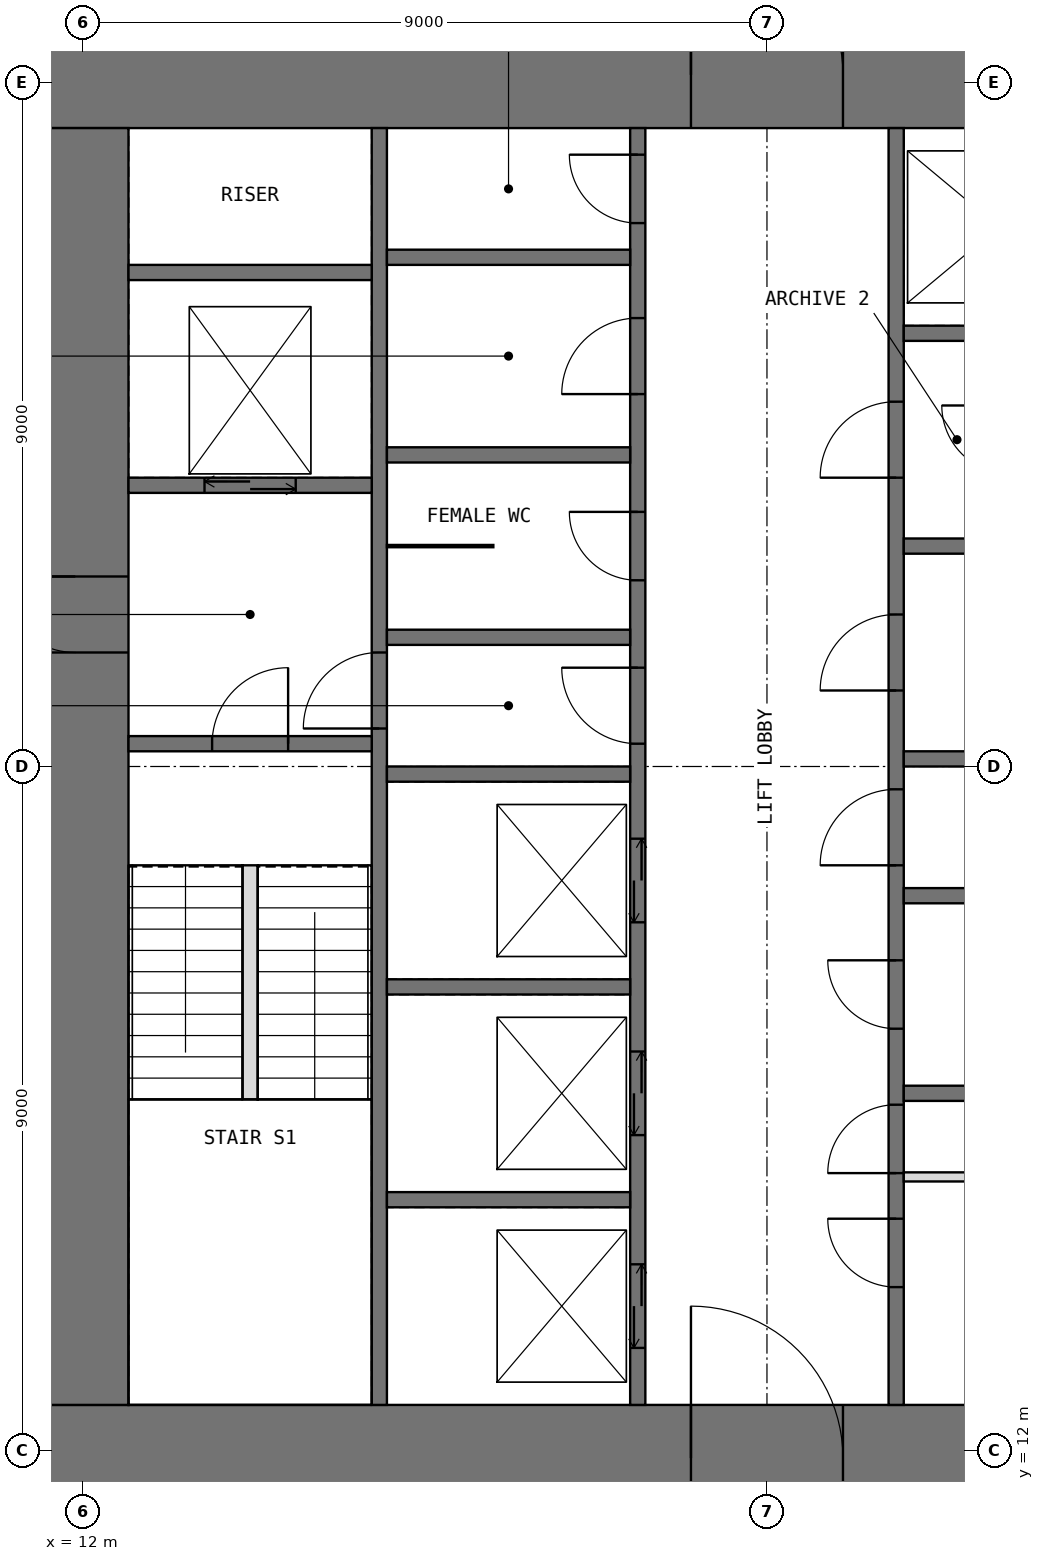
"""IFC4 building model, lengths in metres.
Left out: names, types, materials, properties, quantities, classifications, styles, units other than length and angle.
Written with IfcOpenShell. Run it as: python <this file> out.ifc"""

import sys

from ifc_helpers import new_model, si_unit, direction, frame, frame_2d, origin, place, context, subcontext, project, spatial, rectangle, extrude, element, fill, save


model = new_model("IFC4")
c1 = context("Model", 3, precision=1e-05, world=origin(), true_north=direction((0.0, 1.0)))
c2 = subcontext(c1, "Body", "Model", "MODEL_VIEW")
j1 = project(units=[si_unit("LENGTHUNIT", "METRE"), si_unit("PLANEANGLEUNIT", "RADIAN")], contexts=[c1])
p1 = place(None, origin())
s1 = spatial("IfcSite", under=j1, at=p1, CompositionType="ELEMENT")
p2 = place(p1, origin())
s2 = spatial("IfcBuilding", under=s1, at=p2, CompositionType="ELEMENT")
p3 = place(p2, frame((0.0, 0.0, 182.5)))
s3 = spatial("IfcBuildingStorey", under=s2, at=p3, CompositionType="ELEMENT", Elevation=182.5)
p4 = place(p3, frame((11.2, 11.9, -0.05), z_axis=(0.0, 0.0, 1.0), x_axis=(1.0, 0.0, 0.0)))
e1 = element("IfcWall", 1, at=p4, inside=s3, PredefinedType="SHEAR", context=c2, shape_type="SweptSolid", body=[
    extrude(rectangle(XDim=19.6, YDim=1.4, at=frame_2d((9.8, 0.0))), origin(), (0.0, 0.0, 1.0), 4.0),
])
p5 = place(p4, frame((8.8, 0.0, 0.05)))
e2 = element("IfcOpeningElement", 2, at=p5, cuts=e1, PredefinedType="OPENING", context=c2, shape_type="SweptSolid", body=[
    extrude(rectangle(XDim=2.0, YDim=2.2, at=frame_2d((1.0, 1.1))), frame((0.0, 0.71, 0.0), z_axis=(0.0, -1.0, 0.0), x_axis=(1.0, 0.0, 0.0)), (0.0, 0.0, 1.0), 1.42),
])
p6 = place(p3, frame((11.2, 30.1, -0.05), z_axis=(0.0, 0.0, 1.0), x_axis=(1.0, 0.0, 0.0)))
e3 = element("IfcWall", 3, at=p6, inside=s3, PredefinedType="SHEAR", context=c2, shape_type="SweptSolid", body=[
    extrude(rectangle(XDim=19.6, YDim=1.4, at=frame_2d((9.8, 0.0))), origin(), (0.0, 0.0, 1.0), 4.0),
])
p7 = place(p6, frame((8.8, 0.0, 0.05)))
e4 = element("IfcOpeningElement", 4, at=p7, cuts=e3, PredefinedType="OPENING", context=c2, shape_type="SweptSolid", body=[
    extrude(rectangle(XDim=2.0, YDim=2.2, at=frame_2d((1.0, 1.1))), frame((0.0, 0.71, 0.0), z_axis=(0.0, -1.0, 0.0), x_axis=(1.0, 0.0, 0.0)), (0.0, 0.0, 1.0), 1.42),
])
p8 = place(p3, frame((11.9, 12.6, -0.05), z_axis=(0.0, 0.0, 1.0), x_axis=(0.0, 1.0, 0.0)))
e5 = element("IfcWall", 5, at=p8, inside=s3, PredefinedType="SHEAR", context=c2, shape_type="SweptSolid", body=[
    extrude(rectangle(XDim=16.8, YDim=1.4, at=frame_2d((8.4, 0.0))), origin(), (0.0, 0.0, 1.0), 4.0),
])
p9 = place(p8, frame((9.9, 0.0, 0.05)))
e6 = element("IfcOpeningElement", 6, at=p9, cuts=e5, PredefinedType="OPENING", context=c2, shape_type="SweptSolid", body=[
    extrude(rectangle(XDim=1.0, YDim=2.2, at=frame_2d((0.5, 1.1))), frame((0.0, 0.71, 0.0), z_axis=(0.0, -1.0, 0.0), x_axis=(1.0, 0.0, 0.0)), (0.0, 0.0, 1.0), 1.42),
])
p10 = place(p3, frame((15.9, 12.6, -0.05), z_axis=(0.0, 0.0, 1.0), x_axis=(0.0, 1.0, 0.0)))
e7 = element("IfcWall", 7, at=p10, inside=s3, PredefinedType="SHEAR", context=c2, shape_type="SweptSolid", body=[
    extrude(rectangle(XDim=16.8, YDim=0.2, at=frame_2d((8.4, 0.0))), origin(), (0.0, 0.0, 1.0), 4.0),
])
p11 = place(p10, frame((8.9, 0.0, 0.05)))
e8 = element("IfcOpeningElement", 8, at=p11, cuts=e7, PredefinedType="OPENING", context=c2, shape_type="SweptSolid", body=[
    extrude(rectangle(XDim=1.0, YDim=2.2, at=frame_2d((0.5, 1.1))), frame((0.0, 0.11, 0.0), z_axis=(0.0, -1.0, 0.0), x_axis=(1.0, 0.0, 0.0)), (0.0, 0.0, 1.0), 0.22),
])
p12 = place(p3, frame((19.3, 12.6, -0.05), z_axis=(0.0, 0.0, 1.0), x_axis=(0.0, 1.0, 0.0)))
e9 = element("IfcWall", 9, at=p12, inside=s3, PredefinedType="SHEAR", context=c2, shape_type="SweptSolid", body=[
    extrude(rectangle(XDim=16.8, YDim=0.2, at=frame_2d((8.4, 0.0))), origin(), (0.0, 0.0, 1.0), 4.0),
])
p13 = place(p12, frame((8.7, 0.0, 0.05)))
e10 = element("IfcOpeningElement", 10, at=p13, cuts=e9, PredefinedType="OPENING", context=c2, shape_type="SweptSolid", body=[
    extrude(rectangle(XDim=1.0, YDim=2.2, at=frame_2d((0.5, 1.1))), frame((0.0, 0.11, 0.0), z_axis=(0.0, -1.0, 0.0), x_axis=(1.0, 0.0, 0.0)), (0.0, 0.0, 1.0), 0.22),
])
p14 = place(p12, frame((10.85, 0.0, 0.05)))
e11 = element("IfcOpeningElement", 11, at=p14, cuts=e9, PredefinedType="OPENING", context=c2, shape_type="SweptSolid", body=[
    extrude(rectangle(XDim=0.9, YDim=2.2, at=frame_2d((0.45, 1.1))), frame((0.0, 0.11, 0.0), z_axis=(0.0, -1.0, 0.0), x_axis=(1.0, 0.0, 0.0)), (0.0, 0.0, 1.0), 0.22),
])
p15 = place(p12, frame((13.3, 0.0, 0.05)))
e12 = element("IfcOpeningElement", 12, at=p15, cuts=e9, PredefinedType="OPENING", context=c2, shape_type="SweptSolid", body=[
    extrude(rectangle(XDim=1.0, YDim=2.2, at=frame_2d((0.5, 1.1))), frame((0.0, 0.11, 0.0), z_axis=(0.0, -1.0, 0.0), x_axis=(1.0, 0.0, 0.0)), (0.0, 0.0, 1.0), 0.22),
])
p16 = place(p12, frame((15.55, 0.0, 0.05)))
e13 = element("IfcOpeningElement", 13, at=p16, cuts=e9, PredefinedType="OPENING", context=c2, shape_type="SweptSolid", body=[
    extrude(rectangle(XDim=0.9, YDim=2.2, at=frame_2d((0.45, 1.1))), frame((0.0, 0.11, 0.0), z_axis=(0.0, -1.0, 0.0), x_axis=(1.0, 0.0, 0.0)), (0.0, 0.0, 1.0), 0.22),
])
p17 = place(p12, frame((0.75, 0.0, 0.05)))
e14 = element("IfcOpeningElement", 14, at=p17, cuts=e9, PredefinedType="OPENING", context=c2, shape_type="SweptSolid", body=[
    extrude(rectangle(XDim=1.1, YDim=2.2, at=frame_2d((0.55, 1.1))), frame((0.0, 0.11, 0.0), z_axis=(0.0, -1.0, 0.0), x_axis=(1.0, 0.0, 0.0)), (0.0, 0.0, 1.0), 0.22),
])
p18 = place(p12, frame((3.55, 0.0, 0.05)))
e15 = element("IfcOpeningElement", 15, at=p18, cuts=e9, PredefinedType="OPENING", context=c2, shape_type="SweptSolid", body=[
    extrude(rectangle(XDim=1.1, YDim=2.2, at=frame_2d((0.55, 1.1))), frame((0.0, 0.11, 0.0), z_axis=(0.0, -1.0, 0.0), x_axis=(1.0, 0.0, 0.0)), (0.0, 0.0, 1.0), 0.22),
])
p19 = place(p12, frame((6.35, 0.0, 0.05)))
e16 = element("IfcOpeningElement", 16, at=p19, cuts=e9, PredefinedType="OPENING", context=c2, shape_type="SweptSolid", body=[
    extrude(rectangle(XDim=1.1, YDim=2.2, at=frame_2d((0.55, 1.1))), frame((0.0, 0.11, 0.0), z_axis=(0.0, -1.0, 0.0), x_axis=(1.0, 0.0, 0.0)), (0.0, 0.0, 1.0), 0.22),
])
p20 = place(p3, frame((22.7, 12.6, -0.05), z_axis=(0.0, 0.0, 1.0), x_axis=(0.0, 1.0, 0.0)))
e17 = element("IfcWall", 17, at=p20, inside=s3, PredefinedType="SHEAR", context=c2, shape_type="SweptSolid", body=[
    extrude(rectangle(XDim=16.8, YDim=0.2, at=frame_2d((8.4, 0.0))), origin(), (0.0, 0.0, 1.0), 4.0),
])
p21 = place(p20, frame((3.05, 0.0, 0.05)))
e18 = element("IfcOpeningElement", 18, at=p21, cuts=e17, PredefinedType="OPENING", context=c2, shape_type="SweptSolid", body=[
    extrude(rectangle(XDim=0.9, YDim=2.2, at=frame_2d((0.45, 1.1))), frame((0.0, 0.11, 0.0), z_axis=(0.0, -1.0, 0.0), x_axis=(1.0, 0.0, 0.0)), (0.0, 0.0, 1.0), 0.22),
])
p22 = place(p20, frame((7.1, 0.0, 0.05)))
e19 = element("IfcOpeningElement", 19, at=p22, cuts=e17, PredefinedType="OPENING", context=c2, shape_type="SweptSolid", body=[
    extrude(rectangle(XDim=1.0, YDim=2.2, at=frame_2d((0.5, 1.1))), frame((0.0, 0.11, 0.0), z_axis=(0.0, -1.0, 0.0), x_axis=(1.0, 0.0, 0.0)), (0.0, 0.0, 1.0), 0.22),
])
p23 = place(p20, frame((1.55, 0.0, 0.05)))
e20 = element("IfcOpeningElement", 20, at=p23, cuts=e17, PredefinedType="OPENING", context=c2, shape_type="SweptSolid", body=[
    extrude(rectangle(XDim=0.9, YDim=2.2, at=frame_2d((0.45, 1.1))), frame((0.0, 0.11, 0.0), z_axis=(0.0, -1.0, 0.0), x_axis=(1.0, 0.0, 0.0)), (0.0, 0.0, 1.0), 0.22),
])
p24 = place(p20, frame((4.95, 0.0, 0.05)))
e21 = element("IfcOpeningElement", 21, at=p24, cuts=e17, PredefinedType="OPENING", context=c2, shape_type="SweptSolid", body=[
    extrude(rectangle(XDim=0.9, YDim=2.2, at=frame_2d((0.45, 1.1))), frame((0.0, 0.11, 0.0), z_axis=(0.0, -1.0, 0.0), x_axis=(1.0, 0.0, 0.0)), (0.0, 0.0, 1.0), 0.22),
])
p25 = place(p20, frame((9.4, 0.0, 0.05)))
e22 = element("IfcOpeningElement", 22, at=p25, cuts=e17, PredefinedType="OPENING", context=c2, shape_type="SweptSolid", body=[
    extrude(rectangle(XDim=1.0, YDim=2.2, at=frame_2d((0.5, 1.1))), frame((0.0, 0.11, 0.0), z_axis=(0.0, -1.0, 0.0), x_axis=(1.0, 0.0, 0.0)), (0.0, 0.0, 1.0), 0.22),
])
p26 = place(p20, frame((12.2, 0.0, 0.05)))
e23 = element("IfcOpeningElement", 23, at=p26, cuts=e17, PredefinedType="OPENING", context=c2, shape_type="SweptSolid", body=[
    extrude(rectangle(XDim=1.0, YDim=2.2, at=frame_2d((0.5, 1.1))), frame((0.0, 0.11, 0.0), z_axis=(0.0, -1.0, 0.0), x_axis=(1.0, 0.0, 0.0)), (0.0, 0.0, 1.0), 0.22),
])
p27 = place(p3, frame((12.6, 21.3, -0.05), z_axis=(0.0, 0.0, 1.0), x_axis=(1.0, 0.0, 0.0)))
e24 = element("IfcWall", 24, at=p27, inside=s3, PredefinedType="SHEAR", context=c2, shape_type="SweptSolid", body=[
    extrude(rectangle(XDim=3.2, YDim=0.2, at=frame_2d((1.6, 0.0))), origin(), (0.0, 0.0, 1.0), 4.0),
])
p28 = place(p27, frame((1.1, 0.0, 0.05)))
e25 = element("IfcOpeningElement", 25, at=p28, cuts=e24, PredefinedType="OPENING", context=c2, shape_type="SweptSolid", body=[
    extrude(rectangle(XDim=1.0, YDim=2.2, at=frame_2d((0.5, 1.1))), frame((0.0, 0.11, 0.0), z_axis=(0.0, -1.0, 0.0), x_axis=(1.0, 0.0, 0.0)), (0.0, 0.0, 1.0), 0.22),
])
p29 = place(p3, frame((12.6, 24.7, -0.05), z_axis=(0.0, 0.0, 1.0), x_axis=(1.0, 0.0, 0.0)))
e26 = element("IfcWall", 26, at=p29, inside=s3, PredefinedType="SHEAR", context=c2, shape_type="SweptSolid", body=[
    extrude(rectangle(XDim=3.2, YDim=0.2, at=frame_2d((1.6, 0.0))), origin(), (0.0, 0.0, 1.0), 4.0),
])
p30 = place(p29, frame((1.0, 0.0, 0.05)))
e27 = element("IfcOpeningElement", 27, at=p30, cuts=e26, PredefinedType="OPENING", context=c2, shape_type="SweptSolid", body=[
    extrude(rectangle(XDim=1.2, YDim=2.2, at=frame_2d((0.6, 1.1))), frame((0.0, 0.11, 0.0), z_axis=(0.0, -1.0, 0.0), x_axis=(1.0, 0.0, 0.0)), (0.0, 0.0, 1.0), 0.22),
])
for number, where, z_axis, x_axis in (
    (28, (12.6, 27.5, -0.05), (0.0, 0.0, 1.0), (1.0, 0.0, 0.0)),
    (29, (16.0, 15.3, -0.05), (0.0, 0.0, 1.0), (1.0, 0.0, 0.0)),
    (30, (16.0, 18.1, -0.05), (0.0, 0.0, 1.0), (1.0, 0.0, 0.0)),
    (31, (16.0, 20.9, -0.05), (0.0, 0.0, 1.0), (1.0, 0.0, 0.0)),
    (32, (16.0, 22.7, -0.05), (0.0, 0.0, 1.0), (1.0, 0.0, 0.0)),
    (33, (16.0, 25.1, -0.05), (0.0, 0.0, 1.0), (1.0, 0.0, 0.0)),
    (34, (16.0, 27.7, -0.05), (0.0, 0.0, 1.0), (1.0, 0.0, 0.0)),
    (35, (22.8, 16.7, -0.05), (0.0, 0.0, 1.0), (1.0, 0.0, 0.0)),
    (36, (22.8, 19.3, -0.05), (0.0, 0.0, 1.0), (1.0, 0.0, 0.0)),
    (37, (22.8, 21.1, -0.05), (0.0, 0.0, 1.0), (1.0, 0.0, 0.0)),
    (38, (22.8, 23.9, -0.05), (0.0, 0.0, 1.0), (1.0, 0.0, 0.0)),
    (39, (22.8, 26.7, -0.05), (0.0, 0.0, 1.0), (1.0, 0.0, 0.0)),
):
    element("IfcWall", number, at=place(p3, frame(where, z_axis=z_axis, x_axis=x_axis)), inside=s3, PredefinedType="SHEAR", context=c2, shape_type="SweptSolid", body=[
        extrude(rectangle(XDim=3.2, YDim=0.2, at=frame_2d((1.6, 0.0))), origin(), (0.0, 0.0, 1.0), 4.0),
    ])
p31 = place(p3, frame((22.8, 15.6, 0.0), z_axis=(0.0, 0.0, 1.0), x_axis=(1.0, 0.0, 0.0)))
e40 = element("IfcWall", 40, at=p31, inside=s3, PredefinedType="PARTITIONING", context=c2, shape_type="SweptSolid", body=[
    extrude(rectangle(XDim=3.2, YDim=0.12, at=frame_2d((1.6, 0.0))), origin(), (0.0, 0.0, 1.0), 3.75),
])
p32 = place(p3, frame((16.0, 23.9, 0.0), z_axis=(0.0, 0.0, 1.0), x_axis=(1.0, 0.0, 0.0)))
e41 = element("IfcWall", 41, at=p32, inside=s3, PredefinedType="PARTITIONING", context=c2, shape_type="SweptSolid", body=[
    extrude(rectangle(XDim=1.4, YDim=0.03, at=frame_2d((0.7, 0.0))), origin(), (0.0, 0.0, 1.0), 3.75),
])
p33 = place(p3, frame((14.2, 16.62, 0.0), z_axis=(0.0, 0.0, 1.0), x_axis=(0.0, 1.0, 0.0)))
e42 = element("IfcWall", 42, at=p33, inside=s3, PredefinedType="PARTITIONING", context=c2, shape_type="SweptSolid", body=[
    extrude(rectangle(XDim=3.08, YDim=0.2, at=frame_2d((1.54, 0.0))), origin(), (0.0, 0.0, 1.0), 4.0),
])
p34 = place(p5, origin())
e43 = element("IfcDoor", 43, at=p34, inside=s3, OperationType="DOUBLE_DOOR_SINGLE_SWING", PredefinedType="DOOR", context=c2, shape_type="SweptSolid", body=[
    extrude(rectangle(XDim=2.0, YDim=2.2, at=frame_2d((1.0, 1.1))), frame((0.0, 0.025, 0.0), z_axis=(0.0, -1.0, 0.0), x_axis=(1.0, 0.0, 0.0)), (0.0, 0.0, 1.0), 0.05),
])
fill(e2, e43)
p35 = place(p7, origin())
e44 = element("IfcDoor", 44, at=p35, inside=s3, OperationType="DOUBLE_DOOR_SINGLE_SWING", PredefinedType="DOOR", context=c2, shape_type="SweptSolid", body=[
    extrude(rectangle(XDim=2.0, YDim=2.2, at=frame_2d((1.0, 1.1))), frame((0.0, 0.025, 0.0), z_axis=(0.0, -1.0, 0.0), x_axis=(1.0, 0.0, 0.0)), (0.0, 0.0, 1.0), 0.05),
])
fill(e4, e44)
p36 = place(p21, origin())
e45 = element("IfcDoor", 45, at=p36, inside=s3, OperationType="SINGLE_SWING_LEFT", PredefinedType="DOOR", context=c2, shape_type="SweptSolid", body=[
    extrude(rectangle(XDim=0.9, YDim=2.2, at=frame_2d((0.45, 1.1))), frame((0.0, 0.025, 0.0), z_axis=(0.0, -1.0, 0.0), x_axis=(1.0, 0.0, 0.0)), (0.0, 0.0, 1.0), 0.05),
])
fill(e18, e45)
p37 = place(p9, origin())
e46 = element("IfcDoor", 46, at=p37, inside=s3, OperationType="SINGLE_SWING_RIGHT", PredefinedType="DOOR", context=c2, shape_type="SweptSolid", body=[
    extrude(rectangle(XDim=1.0, YDim=2.2, at=frame_2d((0.5, 1.1))), frame((0.0, 0.025, 0.0), z_axis=(0.0, -1.0, 0.0), x_axis=(1.0, 0.0, 0.0)), (0.0, 0.0, 1.0), 0.05),
])
fill(e6, e46)
p38 = place(p28, origin())
e47 = element("IfcDoor", 47, at=p38, inside=s3, OperationType="SINGLE_SWING_RIGHT", PredefinedType="DOOR", context=c2, shape_type="SweptSolid", body=[
    extrude(rectangle(XDim=1.0, YDim=2.2, at=frame_2d((0.5, 1.1))), frame((0.0, 0.025, 0.0), z_axis=(0.0, -1.0, 0.0), x_axis=(1.0, 0.0, 0.0)), (0.0, 0.0, 1.0), 0.05),
])
fill(e25, e47)
p39 = place(p11, origin())
e48 = element("IfcDoor", 48, at=p39, inside=s3, OperationType="SINGLE_SWING_LEFT", PredefinedType="DOOR", context=c2, shape_type="SweptSolid", body=[
    extrude(rectangle(XDim=1.0, YDim=2.2, at=frame_2d((0.5, 1.1))), frame((0.0, 0.025, 0.0), z_axis=(0.0, -1.0, 0.0), x_axis=(1.0, 0.0, 0.0)), (0.0, 0.0, 1.0), 0.05),
])
fill(e8, e48)
p40 = place(p13, origin())
e49 = element("IfcDoor", 49, at=p40, inside=s3, OperationType="SINGLE_SWING_RIGHT", PredefinedType="DOOR", context=c2, shape_type="SweptSolid", body=[
    extrude(rectangle(XDim=1.0, YDim=2.2, at=frame_2d((0.5, 1.1))), frame((0.0, 0.025, 0.0), z_axis=(0.0, -1.0, 0.0), x_axis=(1.0, 0.0, 0.0)), (0.0, 0.0, 1.0), 0.05),
])
fill(e10, e49)
p41 = place(p22, origin())
e50 = element("IfcDoor", 50, at=p41, inside=s3, OperationType="SINGLE_SWING_LEFT", PredefinedType="DOOR", context=c2, shape_type="SweptSolid", body=[
    extrude(rectangle(XDim=1.0, YDim=2.2, at=frame_2d((0.5, 1.1))), frame((0.0, 0.025, 0.0), z_axis=(0.0, -1.0, 0.0), x_axis=(1.0, 0.0, 0.0)), (0.0, 0.0, 1.0), 0.05),
])
fill(e19, e50)
p42 = place(p14, origin())
e51 = element("IfcDoor", 51, at=p42, inside=s3, OperationType="SINGLE_SWING_RIGHT", PredefinedType="DOOR", context=c2, shape_type="SweptSolid", body=[
    extrude(rectangle(XDim=0.9, YDim=2.2, at=frame_2d((0.45, 1.1))), frame((0.0, 0.025, 0.0), z_axis=(0.0, -1.0, 0.0), x_axis=(1.0, 0.0, 0.0)), (0.0, 0.0, 1.0), 0.05),
])
fill(e11, e51)
p43 = place(p15, origin())
e52 = element("IfcDoor", 52, at=p43, inside=s3, OperationType="SINGLE_SWING_LEFT", PredefinedType="DOOR", context=c2, shape_type="SweptSolid", body=[
    extrude(rectangle(XDim=1.0, YDim=2.2, at=frame_2d((0.5, 1.1))), frame((0.0, 0.025, 0.0), z_axis=(0.0, -1.0, 0.0), x_axis=(1.0, 0.0, 0.0)), (0.0, 0.0, 1.0), 0.05),
])
fill(e12, e52)
p44 = place(p16, origin())
e53 = element("IfcDoor", 53, at=p44, inside=s3, OperationType="SINGLE_SWING_RIGHT", PredefinedType="DOOR", context=c2, shape_type="SweptSolid", body=[
    extrude(rectangle(XDim=0.9, YDim=2.2, at=frame_2d((0.45, 1.1))), frame((0.0, 0.025, 0.0), z_axis=(0.0, -1.0, 0.0), x_axis=(1.0, 0.0, 0.0)), (0.0, 0.0, 1.0), 0.05),
])
fill(e13, e53)
p45 = place(p23, origin())
e54 = element("IfcDoor", 54, at=p45, inside=s3, OperationType="SINGLE_SWING_RIGHT", PredefinedType="DOOR", context=c2, shape_type="SweptSolid", body=[
    extrude(rectangle(XDim=0.9, YDim=2.2, at=frame_2d((0.45, 1.1))), frame((0.0, 0.025, 0.0), z_axis=(0.0, -1.0, 0.0), x_axis=(1.0, 0.0, 0.0)), (0.0, 0.0, 1.0), 0.05),
])
fill(e20, e54)
p46 = place(p24, origin())
e55 = element("IfcDoor", 55, at=p46, inside=s3, OperationType="SINGLE_SWING_RIGHT", PredefinedType="DOOR", context=c2, shape_type="SweptSolid", body=[
    extrude(rectangle(XDim=0.9, YDim=2.2, at=frame_2d((0.45, 1.1))), frame((0.0, 0.025, 0.0), z_axis=(0.0, -1.0, 0.0), x_axis=(1.0, 0.0, 0.0)), (0.0, 0.0, 1.0), 0.05),
])
fill(e21, e55)
p47 = place(p25, origin())
e56 = element("IfcDoor", 56, at=p47, inside=s3, OperationType="SINGLE_SWING_LEFT", PredefinedType="DOOR", context=c2, shape_type="SweptSolid", body=[
    extrude(rectangle(XDim=1.0, YDim=2.2, at=frame_2d((0.5, 1.1))), frame((0.0, 0.025, 0.0), z_axis=(0.0, -1.0, 0.0), x_axis=(1.0, 0.0, 0.0)), (0.0, 0.0, 1.0), 0.05),
])
fill(e22, e56)
p48 = place(p26, origin())
e57 = element("IfcDoor", 57, at=p48, inside=s3, OperationType="SINGLE_SWING_LEFT", PredefinedType="DOOR", context=c2, shape_type="SweptSolid", body=[
    extrude(rectangle(XDim=1.0, YDim=2.2, at=frame_2d((0.5, 1.1))), frame((0.0, 0.025, 0.0), z_axis=(0.0, -1.0, 0.0), x_axis=(1.0, 0.0, 0.0)), (0.0, 0.0, 1.0), 0.05),
])
fill(e23, e57)
p49 = place(p17, origin())
e58 = element("IfcDoor", 58, at=p49, inside=s3, OperationType="DOUBLE_DOOR_SLIDING", PredefinedType="DOOR", context=c2, shape_type="SweptSolid", body=[
    extrude(rectangle(XDim=1.1, YDim=2.2, at=frame_2d((0.55, 1.1))), frame((0.0, 0.025, 0.0), z_axis=(0.0, -1.0, 0.0), x_axis=(1.0, 0.0, 0.0)), (0.0, 0.0, 1.0), 0.05),
])
fill(e14, e58)
p50 = place(p18, origin())
e59 = element("IfcDoor", 59, at=p50, inside=s3, OperationType="DOUBLE_DOOR_SLIDING", PredefinedType="DOOR", context=c2, shape_type="SweptSolid", body=[
    extrude(rectangle(XDim=1.1, YDim=2.2, at=frame_2d((0.55, 1.1))), frame((0.0, 0.025, 0.0), z_axis=(0.0, -1.0, 0.0), x_axis=(1.0, 0.0, 0.0)), (0.0, 0.0, 1.0), 0.05),
])
fill(e15, e59)
p51 = place(p19, origin())
e60 = element("IfcDoor", 60, at=p51, inside=s3, OperationType="DOUBLE_DOOR_SLIDING", PredefinedType="DOOR", context=c2, shape_type="SweptSolid", body=[
    extrude(rectangle(XDim=1.1, YDim=2.2, at=frame_2d((0.55, 1.1))), frame((0.0, 0.025, 0.0), z_axis=(0.0, -1.0, 0.0), x_axis=(1.0, 0.0, 0.0)), (0.0, 0.0, 1.0), 0.05),
])
fill(e16, e60)
p52 = place(p30, origin())
e61 = element("IfcDoor", 61, at=p52, inside=s3, OperationType="DOUBLE_DOOR_SLIDING", PredefinedType="DOOR", context=c2, shape_type="SweptSolid", body=[
    extrude(rectangle(XDim=1.2, YDim=2.2, at=frame_2d((0.6, 1.1))), frame((0.0, 0.025, 0.0), z_axis=(0.0, -1.0, 0.0), x_axis=(1.0, 0.0, 0.0)), (0.0, 0.0, 1.0), 0.05),
])
fill(e27, e61)
save(model, sys.argv[1])
